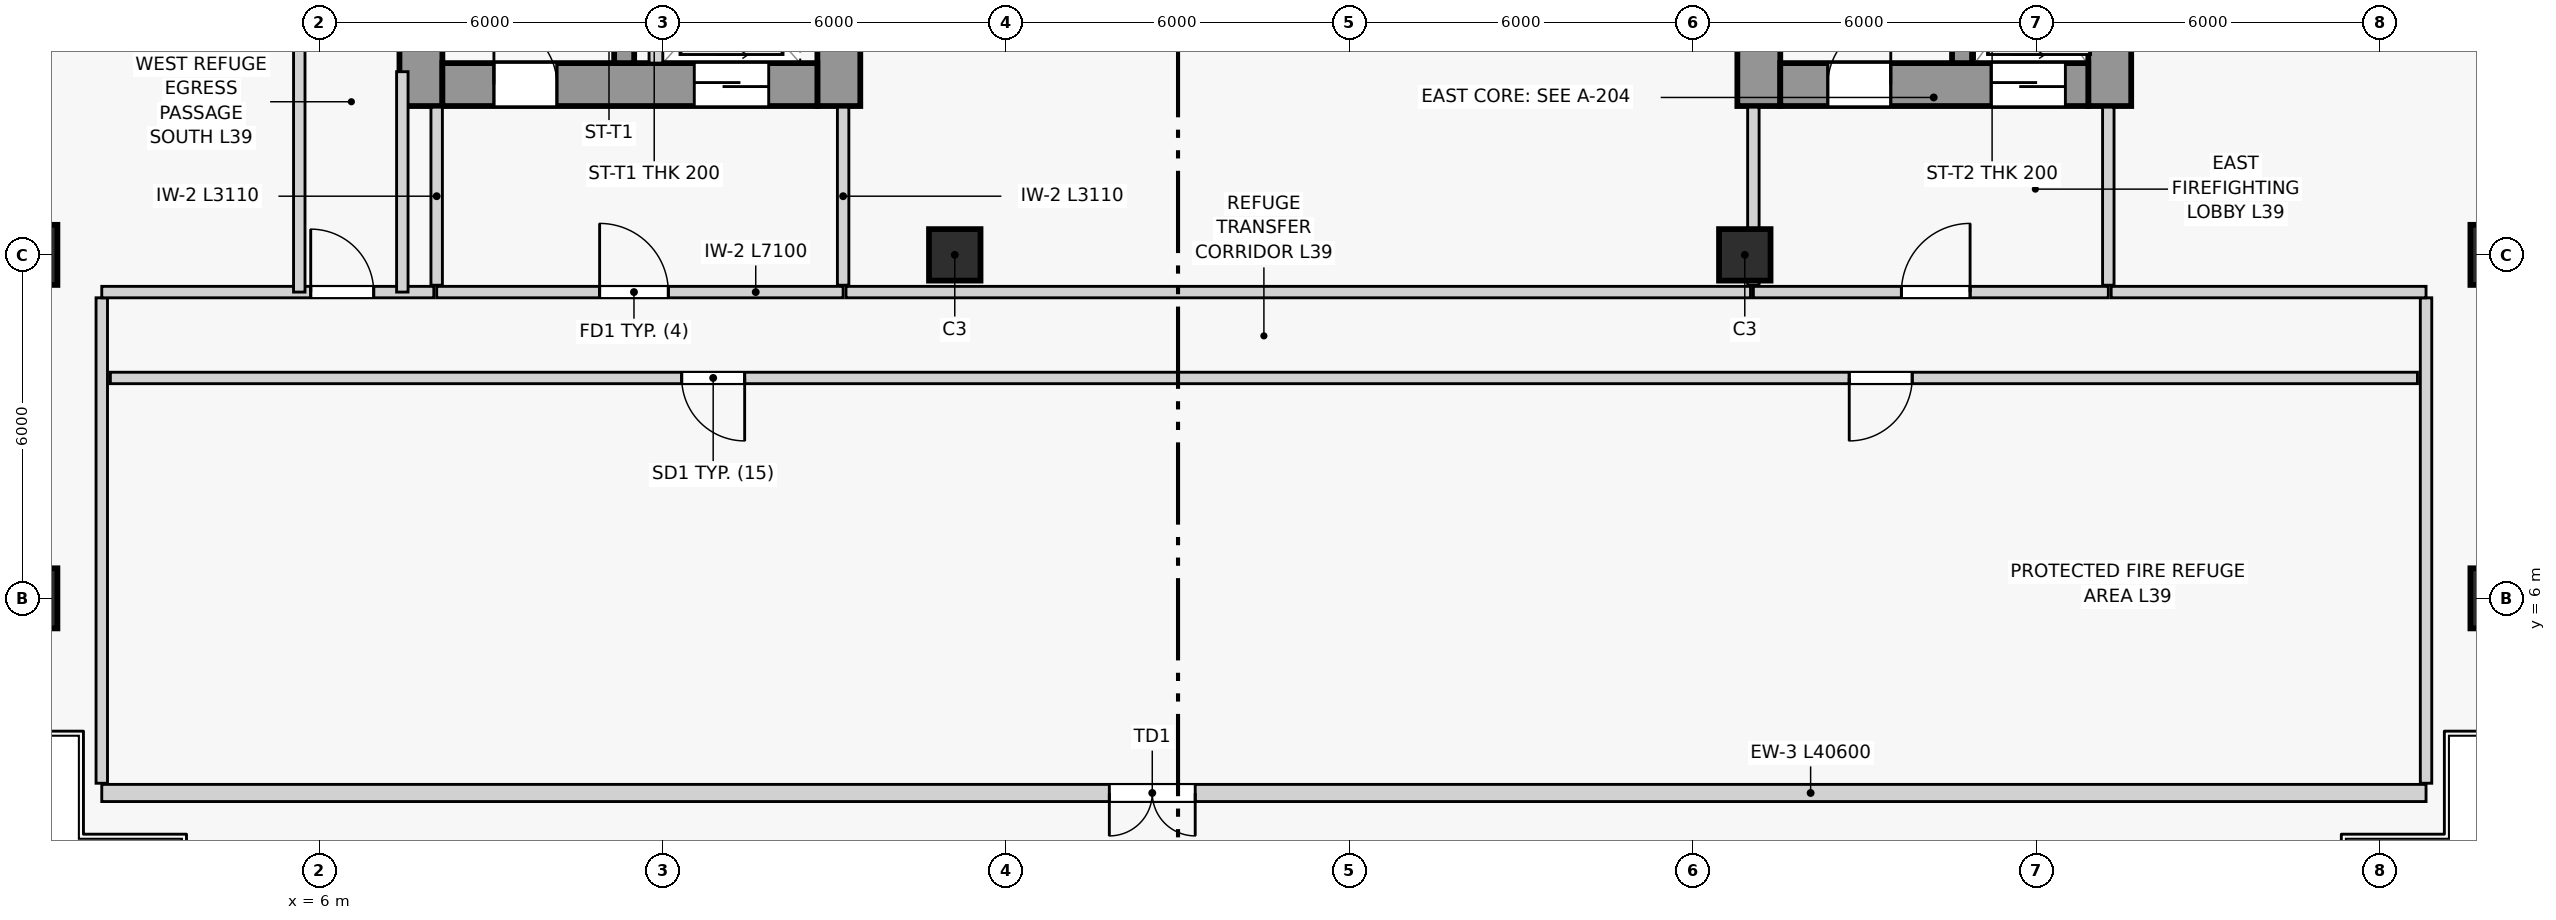
"""IFC4 building model, lengths in metres.
Left out: names, types, materials, properties, quantities, classifications, styles, units other than length and angle.
Written with IfcOpenShell. Run it as: python <this file> out.ifc"""

import sys

from ifc_helpers import new_model, si_unit, direction, frame, frame_2d, origin, origin_2d, place, context, subcontext, project, spatial, rectangle, extrude, source, transform, mapped, element, fill, save


model = new_model("IFC4")
c1 = context("Model", 3, precision=1e-05, world=origin(), true_north=direction((0.0, 1.0)))
c2 = subcontext(c1, "Body", "Model", "MODEL_VIEW")
j1 = project(units=[si_unit("LENGTHUNIT", "METRE"), si_unit("PLANEANGLEUNIT", "RADIAN")], contexts=[c1])
p1 = place(None, origin())
s1 = spatial("IfcSite", under=j1, at=p1, CompositionType="ELEMENT")
p2 = place(p1, origin())
s2 = spatial("IfcBuilding", under=s1, at=p2, CompositionType="ELEMENT")
p3 = place(p2, frame((0.0, 0.0, 148.5)))
s3 = spatial("IfcBuildingStorey", under=s2, at=p3, CompositionType="ELEMENT", Elevation=148.5)
p4 = place(p3, frame((7.775, 14.6, 0.0), z_axis=(0.0, 0.0, 1.0), x_axis=(0.0, 1.0, 0.0)))
e1 = element("IfcWall", 1, at=p4, inside=s3, PredefinedType="SHEAR", context=c2, shape_type="SweptSolid", body=[
    extrude(rectangle(XDim=12.85, YDim=0.75, at=frame_2d((6.425, 0.0))), origin(), (0.0, 0.0, 1.0), 7.2),
])
p5 = place(p3, frame((15.075, 14.6, 0.0), z_axis=(0.0, 0.0, 1.0), x_axis=(0.0, 1.0, 0.0)))
e2 = element("IfcWall", 2, at=p5, inside=s3, PredefinedType="SHEAR", context=c2, shape_type="SweptSolid", body=[
    extrude(rectangle(XDim=12.85, YDim=0.75, at=frame_2d((6.425, 0.0))), origin(), (0.0, 0.0, 1.0), 7.2),
])
p6 = place(p5, frame((5.5, 0.0, 0.0)))
e3 = element("IfcOpeningElement", 3, at=p6, cuts=e2, PredefinedType="OPENING", context=c2, shape_type="SweptSolid", body=[
    extrude(rectangle(XDim=1.1, YDim=2.2, at=frame_2d((0.55, 1.1))), frame((0.0, 0.385, 0.0), z_axis=(0.0, -1.0, 0.0), x_axis=(1.0, 0.0, 0.0)), (0.0, 0.0, 1.0), 0.77),
])
p7 = place(p3, frame((8.15, 14.975, 0.0), z_axis=(0.0, 0.0, 1.0), x_axis=(1.0, 0.0, 0.0)))
e4 = element("IfcWall", 4, at=p7, inside=s3, PredefinedType="SHEAR", context=c2, shape_type="SweptSolid", body=[
    extrude(rectangle(XDim=6.55, YDim=0.75, at=frame_2d((3.275, 0.0))), origin(), (0.0, 0.0, 1.0), 7.2),
])
p8 = place(p7, frame((0.9, 0.0, 0.0)))
e5 = element("IfcOpeningElement", 5, at=p8, cuts=e4, PredefinedType="OPENING", context=c2, shape_type="SweptSolid", body=[
    extrude(rectangle(XDim=1.1, YDim=2.2, at=frame_2d((0.55, 1.1))), frame((0.0, 0.385, 0.0), z_axis=(0.0, -1.0, 0.0), x_axis=(1.0, 0.0, 0.0)), (0.0, 0.0, 1.0), 0.77),
])
p9 = place(p7, frame((4.4, 0.0, 0.0)))
e6 = element("IfcOpeningElement", 6, at=p9, cuts=e4, PredefinedType="OPENING", context=c2, shape_type="SweptSolid", body=[
    extrude(rectangle(XDim=1.3, YDim=2.2, at=frame_2d((0.65, 1.1))), frame((0.0, 0.385, 0.0), z_axis=(0.0, -1.0, 0.0), x_axis=(1.0, 0.0, 0.0)), (0.0, 0.0, 1.0), 0.77),
])
p10 = place(p3, frame((31.145, 14.6, 0.0), z_axis=(0.0, 0.0, 1.0), x_axis=(0.0, 1.0, 0.0)))
e7 = element("IfcWall", 7, at=p10, inside=s3, PredefinedType="SHEAR", context=c2, shape_type="SweptSolid", body=[
    extrude(rectangle(XDim=12.85, YDim=0.75, at=frame_2d((6.425, 0.0))), origin(), (0.0, 0.0, 1.0), 7.2),
])
p11 = place(p3, frame((37.275, 14.6, 0.0), z_axis=(0.0, 0.0, 1.0), x_axis=(0.0, 1.0, 0.0)))
e8 = element("IfcWall", 8, at=p11, inside=s3, PredefinedType="SHEAR", context=c2, shape_type="SweptSolid", body=[
    extrude(rectangle(XDim=12.85, YDim=0.75, at=frame_2d((6.425, 0.0))), origin(), (0.0, 0.0, 1.0), 7.2),
])
p12 = place(p11, frame((5.5, 0.0, 0.0)))
e9 = element("IfcOpeningElement", 9, at=p12, cuts=e8, PredefinedType="OPENING", context=c2, shape_type="SweptSolid", body=[
    extrude(rectangle(XDim=1.1, YDim=2.2, at=frame_2d((0.55, 1.1))), frame((0.0, 0.385, 0.0), z_axis=(0.0, -1.0, 0.0), x_axis=(1.0, 0.0, 0.0)), (0.0, 0.0, 1.0), 0.77),
])
p13 = place(p3, frame((31.52, 14.975, 0.0), z_axis=(0.0, 0.0, 1.0), x_axis=(1.0, 0.0, 0.0)))
e10 = element("IfcWall", 10, at=p13, inside=s3, PredefinedType="SHEAR", context=c2, shape_type="SweptSolid", body=[
    extrude(rectangle(XDim=5.38, YDim=0.75, at=frame_2d((2.69, 0.0))), origin(), (0.0, 0.0, 1.0), 7.2),
])
p14 = place(p13, frame((0.83, 0.0, 0.0)))
e11 = element("IfcOpeningElement", 11, at=p14, cuts=e10, PredefinedType="OPENING", context=c2, shape_type="SweptSolid", body=[
    extrude(rectangle(XDim=1.1, YDim=2.2, at=frame_2d((0.55, 1.1))), frame((0.0, 0.385, 0.0), z_axis=(0.0, -1.0, 0.0), x_axis=(1.0, 0.0, 0.0)), (0.0, 0.0, 1.0), 0.77),
])
p15 = place(p13, frame((3.68, 0.0, 0.0)))
e12 = element("IfcOpeningElement", 12, at=p15, cuts=e10, PredefinedType="OPENING", context=c2, shape_type="SweptSolid", body=[
    extrude(rectangle(XDim=1.3, YDim=2.2, at=frame_2d((0.65, 1.1))), frame((0.0, 0.385, 0.0), z_axis=(0.0, -1.0, 0.0), x_axis=(1.0, 0.0, 0.0)), (0.0, 0.0, 1.0), 0.77),
])
for number, where, z_axis, x_axis in (
    (13, (11.325, 15.35, 0.0), (0.0, 0.0, 1.0), (0.0, 1.0, 0.0)),
    (14, (34.695, 15.35, 0.0), (0.0, 0.0, 1.0), (0.0, 1.0, 0.0)),
):
    element("IfcWall", number, at=place(p3, frame(where, z_axis=z_axis, x_axis=x_axis)), inside=s3, PredefinedType="SHEAR", context=c2, shape_type="SweptSolid", body=[
        extrude(rectangle(XDim=7.75, YDim=0.35, at=frame_2d((3.875, 0.0))), origin(), (0.0, 0.0, 1.0), 7.2),
    ])
m1 = source(origin(), c2, "Body", "SweptSolid", [
    extrude(rectangle(XDim=1.05, YDim=1.05, at=origin_2d()), origin(), (0.0, 0.0, 1.0), 7.2),
])
for number, where, z_axis, x_axis in (
    (15, (0.9, 6.0, 0.0), (0.0, 0.0, 1.0), (1.0, 0.0, 0.0)),
    (16, (44.1, 6.0, 0.0), (0.0, 0.0, 1.0), (1.0, 0.0, 0.0)),
    (17, (0.9, 12.0, 0.0), (0.0, 0.0, 1.0), (1.0, 0.0, 0.0)),
    (18, (44.1, 12.0, 0.0), (0.0, 0.0, 1.0), (1.0, 0.0, 0.0)),
):
    element("IfcColumn", number, at=place(p3, frame(where, z_axis=z_axis, x_axis=x_axis)), inside=s3, PredefinedType="COLUMN", context=c2, shape_type="MappedRepresentation", body=[
        mapped(m1, transform((0.0, 0.0, 0.0), scale=1.0)),
    ])
m2 = source(origin(), c2, "Body", "SweptSolid", [
    extrude(rectangle(XDim=0.9, YDim=0.9, at=origin_2d()), origin(), (0.0, 0.0, 1.0), 7.2),
])
for number, where, z_axis, x_axis in (
    (19, (17.1, 12.0, 0.0), (0.0, 0.0, 1.0), (1.0, 0.0, 0.0)),
    (20, (30.9, 12.0, 0.0), (0.0, 0.0, 1.0), (1.0, 0.0, 0.0)),
):
    element("IfcColumn", number, at=place(p3, frame(where, z_axis=z_axis, x_axis=x_axis)), inside=s3, PredefinedType="COLUMN", context=c2, shape_type="MappedRepresentation", body=[
        mapped(m2, transform((0.0, 0.0, 0.0), scale=1.0)),
    ])
p16 = place(p3, frame((2.2, 2.6, 0.0), z_axis=(0.0, 0.0, 1.0), x_axis=(1.0, 0.0, 0.0)))
e21 = element("IfcWall", 21, at=p16, inside=s3, PredefinedType="SOLIDWALL", context=c2, shape_type="SweptSolid", body=[
    extrude(rectangle(XDim=40.6, YDim=0.3, at=frame_2d((20.3, 0.0))), origin(), (0.0, 0.0, 1.0), 6.55),
])
p17 = place(p16, frame((17.6, 0.0, 0.0)))
e22 = element("IfcOpeningElement", 22, at=p17, cuts=e21, PredefinedType="OPENING", context=c2, shape_type="SweptSolid", body=[
    extrude(rectangle(XDim=1.5, YDim=2.3, at=frame_2d((0.75, 1.15))), frame((0.0, 0.16, 0.0), z_axis=(0.0, -1.0, 0.0), x_axis=(1.0, 0.0, 0.0)), (0.0, 0.0, 1.0), 0.32),
])
p18 = place(p3, frame((11.88, 15.35, 0.0), z_axis=(0.0, 0.0, 1.0), x_axis=(0.0, 1.0, 0.0)))
e23 = element("IfcWall", 23, at=p18, inside=s3, PredefinedType="PARTITIONING", context=c2, shape_type="SweptSolid", body=[
    extrude(rectangle(XDim=2.85, YDim=0.24, at=frame_2d((1.425, 0.0))), origin(), (0.0, 0.0, 1.0), 6.55),
])
p19 = place(p3, frame((8.05, 11.35, 0.0), z_axis=(0.0, 0.0, 1.0), x_axis=(1.0, 0.0, 0.0)))
e24 = element("IfcWall", 24, at=p19, inside=s3, PredefinedType="PARTITIONING", context=c2, shape_type="SweptSolid", body=[
    extrude(rectangle(XDim=7.1, YDim=0.2, at=frame_2d((3.55, 0.0))), origin(), (0.0, 0.0, 1.0), 4.95),
])
p20 = place(p19, frame((2.846, 0.0, 0.0)))
e25 = element("IfcOpeningElement", 25, at=p20, cuts=e24, PredefinedType="OPENING", context=c2, shape_type="SweptSolid", body=[
    extrude(rectangle(XDim=1.2, YDim=2.2, at=frame_2d((0.6, 1.1))), frame((0.0, 0.11, 0.0), z_axis=(0.0, -1.0, 0.0), x_axis=(1.0, 0.0, 0.0)), (0.0, 0.0, 1.0), 0.22),
])
for number, where, z_axis, x_axis in (
    (26, (8.05, 11.47, 0.0), (0.0, 0.0, 1.0), (0.0, 1.0, 0.0)),
    (27, (15.15, 11.47, 0.0), (0.0, 0.0, 1.0), (0.0, 1.0, 0.0)),
):
    element("IfcWall", number, at=place(p3, frame(where, z_axis=z_axis, x_axis=x_axis)), inside=s3, PredefinedType="PARTITIONING", context=c2, shape_type="SweptSolid", body=[
        extrude(rectangle(XDim=3.11, YDim=0.2, at=frame_2d((1.555, 0.0))), origin(), (0.0, 0.0, 1.0), 6.55),
    ])
p21 = place(p3, frame((31.05, 11.35, 0.0), z_axis=(0.0, 0.0, 1.0), x_axis=(1.0, 0.0, 0.0)))
e28 = element("IfcWall", 28, at=p21, inside=s3, PredefinedType="PARTITIONING", context=c2, shape_type="SweptSolid", body=[
    extrude(rectangle(XDim=6.2, YDim=0.2, at=frame_2d((3.1, 0.0))), origin(), (0.0, 0.0, 1.0), 4.95),
])
p22 = place(p21, frame((2.586, 0.0, 0.0)))
e29 = element("IfcOpeningElement", 29, at=p22, cuts=e28, PredefinedType="OPENING", context=c2, shape_type="SweptSolid", body=[
    extrude(rectangle(XDim=1.2, YDim=2.2, at=frame_2d((0.6, 1.1))), frame((0.0, 0.11, 0.0), z_axis=(0.0, -1.0, 0.0), x_axis=(1.0, 0.0, 0.0)), (0.0, 0.0, 1.0), 0.22),
])
p23 = place(p3, frame((31.05, 11.47, 0.0), z_axis=(0.0, 0.0, 1.0), x_axis=(0.0, 1.0, 0.0)))
e30 = element("IfcWall", 30, at=p23, inside=s3, PredefinedType="PARTITIONING", context=c2, shape_type="SweptSolid", body=[
    extrude(rectangle(XDim=3.11, YDim=0.2, at=frame_2d((1.555, 0.0))), origin(), (0.0, 0.0, 1.0), 4.95),
])
p24 = place(p3, frame((37.25, 11.47, 0.0), z_axis=(0.0, 0.0, 1.0), x_axis=(0.0, 1.0, 0.0)))
e31 = element("IfcWall", 31, at=p24, inside=s3, PredefinedType="PARTITIONING", context=c2, shape_type="SweptSolid", body=[
    extrude(rectangle(XDim=3.11, YDim=0.2, at=frame_2d((1.555, 0.0))), origin(), (0.0, 0.0, 1.0), 6.55),
])
for number, where, z_axis, x_axis in (
    (32, (2.2, 2.77, 0.0), (0.0, 0.0, 1.0), (0.0, 1.0, 0.0)),
    (33, (42.8, 2.77, 0.0), (0.0, 0.0, 1.0), (0.0, 1.0, 0.0)),
):
    element("IfcWall", number, at=place(p3, frame(where, z_axis=z_axis, x_axis=x_axis)), inside=s3, PredefinedType="PARTITIONING", context=c2, shape_type="SweptSolid", body=[
        extrude(rectangle(XDim=8.48, YDim=0.2, at=frame_2d((4.24, 0.0))), origin(), (0.0, 0.0, 1.0), 6.55),
    ])
p25 = place(p3, frame((2.2, 11.35, 0.0), z_axis=(0.0, 0.0, 1.0), x_axis=(1.0, 0.0, 0.0)))
e34 = element("IfcWall", 34, at=p25, inside=s3, PredefinedType="PARTITIONING", context=c2, shape_type="SweptSolid", body=[
    extrude(rectangle(XDim=5.8, YDim=0.2, at=frame_2d((2.9, 0.0))), origin(), (0.0, 0.0, 1.0), 4.95),
])
p26 = place(p25, frame((3.65, 0.0, 0.0)))
e35 = element("IfcOpeningElement", 35, at=p26, cuts=e34, PredefinedType="OPENING", context=c2, shape_type="SweptSolid", body=[
    extrude(rectangle(XDim=1.1, YDim=2.2, at=frame_2d((0.55, 1.1))), frame((0.0, 0.11, 0.0), z_axis=(0.0, -1.0, 0.0), x_axis=(1.0, 0.0, 0.0)), (0.0, 0.0, 1.0), 0.22),
])
p27 = place(p3, frame((15.2, 11.35, 0.0), z_axis=(0.0, 0.0, 1.0), x_axis=(1.0, 0.0, 0.0)))
e36 = element("IfcWall", 36, at=p27, inside=s3, PredefinedType="PARTITIONING", context=c2, shape_type="SweptSolid", body=[
    extrude(rectangle(XDim=15.8, YDim=0.2, at=frame_2d((7.9, 0.0))), origin(), (0.0, 0.0, 1.0), 4.95),
])
p28 = place(p3, frame((37.3, 11.35, 0.0), z_axis=(0.0, 0.0, 1.0), x_axis=(1.0, 0.0, 0.0)))
e37 = element("IfcWall", 37, at=p28, inside=s3, PredefinedType="PARTITIONING", context=c2, shape_type="SweptSolid", body=[
    extrude(rectangle(XDim=5.5, YDim=0.2, at=frame_2d((2.75, 0.0))), origin(), (0.0, 0.0, 1.0), 4.95),
])
p29 = place(p3, frame((2.35, 9.85, 0.0), z_axis=(0.0, 0.0, 1.0), x_axis=(1.0, 0.0, 0.0)))
e38 = element("IfcWall", 38, at=p29, inside=s3, PredefinedType="PARTITIONING", context=c2, shape_type="SweptSolid", body=[
    extrude(rectangle(XDim=40.3, YDim=0.2, at=frame_2d((20.15, 0.0))), origin(), (0.0, 0.0, 1.0), 6.55),
])
p30 = place(p29, frame((9.98, 0.0, 0.0)))
e39 = element("IfcOpeningElement", 39, at=p30, cuts=e38, PredefinedType="OPENING", context=c2, shape_type="SweptSolid", body=[
    extrude(rectangle(XDim=1.1, YDim=2.2, at=frame_2d((0.55, 1.1))), frame((0.0, 0.11, 0.0), z_axis=(0.0, -1.0, 0.0), x_axis=(1.0, 0.0, 0.0)), (0.0, 0.0, 1.0), 0.22),
])
p31 = place(p29, frame((30.375, 0.0, 0.0)))
e40 = element("IfcOpeningElement", 40, at=p31, cuts=e38, PredefinedType="OPENING", context=c2, shape_type="SweptSolid", body=[
    extrude(rectangle(XDim=1.1, YDim=2.2, at=frame_2d((0.55, 1.1))), frame((0.0, 0.11, 0.0), z_axis=(0.0, -1.0, 0.0), x_axis=(1.0, 0.0, 0.0)), (0.0, 0.0, 1.0), 0.22),
])
p32 = place(p3, frame((5.65, 11.35, 0.0), z_axis=(0.0, 0.0, 1.0), x_axis=(0.0, 1.0, 0.0)))
e41 = element("IfcWall", 41, at=p32, inside=s3, PredefinedType="PARTITIONING", context=c2, shape_type="SweptSolid", body=[
    extrude(rectangle(XDim=6.23, YDim=0.2, at=frame_2d((3.115, 0.0))), origin(), (0.0, 0.0, 1.0), 4.95),
])
p33 = place(p3, frame((7.45, 11.35, 0.0), z_axis=(0.0, 0.0, 1.0), x_axis=(0.0, 1.0, 0.0)))
e42 = element("IfcWall", 42, at=p33, inside=s3, PredefinedType="PARTITIONING", context=c2, shape_type="SweptSolid", body=[
    extrude(rectangle(XDim=3.85, YDim=0.2, at=frame_2d((1.925, 0.0))), origin(), (0.0, 0.0, 1.0), 6.55),
])
m3 = source(origin(), c2, "Body", "SweptSolid", [
    extrude(rectangle(XDim=1.5, YDim=2.3, at=frame_2d((0.75, 1.15))), frame((0.0, 0.025, 0.0), z_axis=(0.0, -1.0, 0.0), x_axis=(1.0, 0.0, 0.0)), (0.0, 0.0, 1.0), 0.05),
])
p34 = place(p17, frame((1.5, 0.0, 0.0), z_axis=(0.0, 0.0, 1.0), x_axis=(-1.0, 0.0, 0.0)))
e43 = element("IfcDoor", 43, at=p34, inside=s3, OperationType="DOUBLE_DOOR_SINGLE_SWING", PredefinedType="DOOR", context=c2, shape_type="MappedRepresentation", body=[
    mapped(m3, transform((0.0, 0.0, 0.0), scale=1.0)),
])
fill(e22, e43)
m4 = source(origin(), c2, "Body", "SweptSolid", [
    extrude(rectangle(XDim=1.1, YDim=2.2, at=frame_2d((0.55, 1.1))), frame((0.0, 0.025, 0.0), z_axis=(0.0, -1.0, 0.0), x_axis=(1.0, 0.0, 0.0)), (0.0, 0.0, 1.0), 0.05),
])
p35 = place(p8, origin())
e44 = element("IfcDoor", 44, at=p35, inside=s3, OperationType="SINGLE_SWING_LEFT", PredefinedType="DOOR", context=c2, shape_type="MappedRepresentation", body=[
    mapped(m4, transform((0.0, 0.0, 0.0), scale=1.0)),
])
fill(e5, e44)
p36 = place(p14, origin())
e45 = element("IfcDoor", 45, at=p36, inside=s3, OperationType="SINGLE_SWING_RIGHT", PredefinedType="DOOR", context=c2, shape_type="MappedRepresentation", body=[
    mapped(m4, transform((0.0, 0.0, 0.0), scale=1.0)),
])
fill(e11, e45)
m5 = source(origin(), c2, "Body", "SweptSolid", [
    extrude(rectangle(XDim=1.3, YDim=2.2, at=frame_2d((0.65, 1.1))), frame((0.0, 0.025, 0.0), z_axis=(0.0, -1.0, 0.0), x_axis=(1.0, 0.0, 0.0)), (0.0, 0.0, 1.0), 0.05),
])
p37 = place(p9, origin())
e46 = element("IfcDoor", 46, at=p37, inside=s3, OperationType="SLIDING_TO_RIGHT", PredefinedType="DOOR", context=c2, shape_type="MappedRepresentation", body=[
    mapped(m5, transform((0.0, 0.0, 0.0), scale=1.0)),
])
fill(e6, e46)
p38 = place(p15, origin())
e47 = element("IfcDoor", 47, at=p38, inside=s3, OperationType="SLIDING_TO_RIGHT", PredefinedType="DOOR", context=c2, shape_type="MappedRepresentation", body=[
    mapped(m5, transform((0.0, 0.0, 0.0), scale=1.0)),
])
fill(e12, e47)
m6 = source(origin(), c2, "Body", "SweptSolid", [
    extrude(rectangle(XDim=1.2, YDim=2.2, at=frame_2d((0.6, 1.1))), frame((0.0, 0.025, 0.0), z_axis=(0.0, -1.0, 0.0), x_axis=(1.0, 0.0, 0.0)), (0.0, 0.0, 1.0), 0.05),
])
p39 = place(p20, origin())
e48 = element("IfcDoor", 48, at=p39, inside=s3, OperationType="SINGLE_SWING_LEFT", PredefinedType="DOOR", context=c2, shape_type="MappedRepresentation", body=[
    mapped(m6, transform((0.0, 0.0, 0.0), scale=1.0)),
])
fill(e25, e48)
p40 = place(p22, origin())
e49 = element("IfcDoor", 49, at=p40, inside=s3, OperationType="SINGLE_SWING_RIGHT", PredefinedType="DOOR", context=c2, shape_type="MappedRepresentation", body=[
    mapped(m6, transform((0.0, 0.0, 0.0), scale=1.0)),
])
fill(e29, e49)
p41 = place(p30, frame((1.1, 0.0, 0.0), z_axis=(0.0, 0.0, 1.0), x_axis=(-1.0, 0.0, 0.0)))
e50 = element("IfcDoor", 50, at=p41, inside=s3, OperationType="SINGLE_SWING_LEFT", PredefinedType="DOOR", context=c2, shape_type="MappedRepresentation", body=[
    mapped(m4, transform((0.0, 0.0, 0.0), scale=1.0)),
])
fill(e39, e50)
p42 = place(p31, frame((1.1, 0.0, 0.0), z_axis=(0.0, 0.0, 1.0), x_axis=(-1.0, 0.0, 0.0)))
e51 = element("IfcDoor", 51, at=p42, inside=s3, OperationType="SINGLE_SWING_RIGHT", PredefinedType="DOOR", context=c2, shape_type="MappedRepresentation", body=[
    mapped(m4, transform((0.0, 0.0, 0.0), scale=1.0)),
])
fill(e40, e51)
p43 = place(p26, origin())
e52 = element("IfcDoor", 52, at=p43, inside=s3, OperationType="SINGLE_SWING_LEFT", PredefinedType="DOOR", context=c2, shape_type="MappedRepresentation", body=[
    mapped(m4, transform((0.0, 0.0, 0.0), scale=1.0)),
])
fill(e35, e52)
save(model, sys.argv[1])
